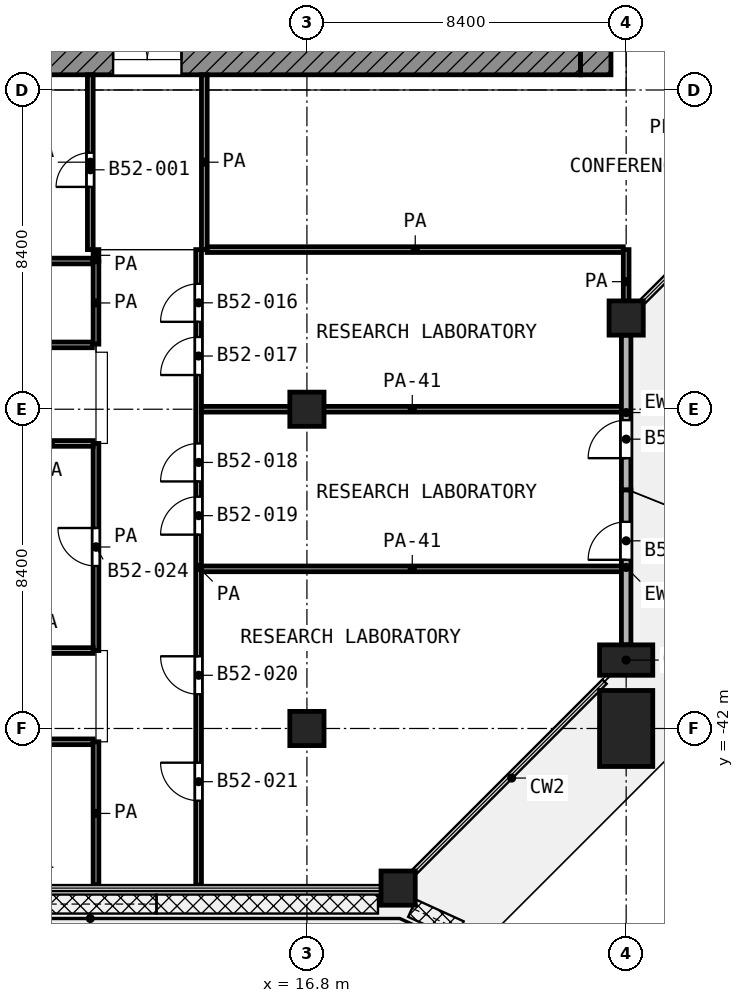
"""IFC4 building model, lengths in metres.
Left out: names, types, materials, properties, quantities, classifications, styles, units other than length and angle.
Written with IfcOpenShell. Run it as: python <this file> out.ifc"""

import sys

from ifc_helpers import new_model, si_unit, direction, frame, frame_2d, origin, origin_2d, place, context, subcontext, project, spatial, rectangle, extrude, element, fill, save


model = new_model("IFC4")
c1 = context("Model", 3, precision=1e-05, world=origin(), true_north=direction((0.0, 1.0)))
c2 = subcontext(c1, "Body", "Model", "MODEL_VIEW")
j1 = project(units=[si_unit("LENGTHUNIT", "METRE"), si_unit("PLANEANGLEUNIT", "RADIAN")], contexts=[c1])
p1 = place(None, origin())
s1 = spatial("IfcSite", under=j1, at=p1, CompositionType="ELEMENT")
p2 = place(p1, origin())
s2 = spatial("IfcBuilding", under=s1, at=p2, CompositionType="ELEMENT")
p3 = place(p2, frame((0.0, 0.0, 226.4)))
s3 = spatial("IfcBuildingStorey", under=s2, at=p3, CompositionType="ELEMENT", Elevation=226.4)
for number, where, z_axis, x_axis in (
    (1, (25.2, -31.2, 0.0), (0.0, 0.0, 1.0), (1.0, 0.0, 0.0)),
    (2, (16.8, -33.6, 0.0), (0.0, 0.0, 1.0), (1.0, 0.0, 0.0)),
):
    element("IfcColumn", number, at=place(p3, frame(where, z_axis=z_axis, x_axis=x_axis)), inside=s3, PredefinedType="COLUMN", context=c2, shape_type="SweptSolid", body=[
        extrude(rectangle(XDim=0.9, YDim=0.9, at=origin_2d()), origin(), (0.0, 0.0, 1.0), 4.2),
    ])
p4 = place(p3, frame((25.2, -40.2, 0.0), z_axis=(0.0, 0.0, 1.0), x_axis=(0.0, -1.0, 0.0)))
e3 = element("IfcColumn", 3, at=p4, inside=s3, PredefinedType="COLUMN", context=c2, shape_type="SweptSolid", body=[
    extrude(rectangle(XDim=0.8, YDim=1.4, at=origin_2d()), origin(), (0.0, 0.0, 1.0), 4.2),
])
for number, where, z_axis, x_axis in (
    (4, (16.8, -42.0, 0.0), (0.0, 0.0, 1.0), (1.0, 0.0, 0.0)),
    (5, (19.2, -46.2, 0.0), (0.0, 0.0, 1.0), (1.0, 0.0, 0.0)),
):
    element("IfcColumn", number, at=place(p3, frame(where, z_axis=z_axis, x_axis=x_axis)), inside=s3, PredefinedType="COLUMN", context=c2, shape_type="SweptSolid", body=[
        extrude(rectangle(XDim=0.9, YDim=0.9, at=origin_2d()), origin(), (0.0, 0.0, 1.0), 4.2),
    ])
p5 = place(p3, frame((25.2, -42.0, 0.0), z_axis=(0.0, 0.0, 1.0), x_axis=(0.0, -1.0, 0.0)))
e6 = element("IfcColumn", 6, at=p5, inside=s3, PredefinedType="COLUMN", context=c2, shape_type="SweptSolid", body=[
    extrude(rectangle(XDim=2.0, YDim=1.4, at=origin_2d()), origin(), (0.0, 0.0, 1.0), 4.2),
])
p6 = place(p3, frame((25.2, -39.8, 0.0), z_axis=(0.0, 0.0, 1.0), x_axis=(0.0, 1.0, 0.0)))
e7 = element("IfcWall", 7, at=p6, inside=s3, PredefinedType="SOLIDWALL", context=c2, shape_type="SweptSolid", body=[
    extrude(rectangle(XDim=4.075, YDim=0.25, at=frame_2d((2.038, 0.0))), origin(), (0.0, 0.0, 1.0), 2.58),
])
p7 = place(p6, frame((2.238, 0.0, 0.0)))
e8 = element("IfcOpeningElement", 8, at=p7, cuts=e7, PredefinedType="OPENING", context=c2, shape_type="SweptSolid", body=[
    extrude(rectangle(XDim=1.0, YDim=2.1, at=frame_2d((0.5, 1.05))), frame((0.0, 0.135, 0.0), z_axis=(0.0, -1.0, 0.0), x_axis=(1.0, 0.0, 0.0)), (0.0, 0.0, 1.0), 0.27),
])
p8 = place(p3, frame((25.2, -35.725, 0.0), z_axis=(0.0, 0.0, 1.0), x_axis=(0.0, 1.0, 0.0)))
e9 = element("IfcWall", 9, at=p8, inside=s3, PredefinedType="SOLIDWALL", context=c2, shape_type="SweptSolid", body=[
    extrude(rectangle(XDim=4.075, YDim=0.25, at=frame_2d((2.038, 0.0))), origin(), (0.0, 0.0, 1.0), 2.58),
])
p9 = place(p8, frame((0.837, 0.0, 0.0)))
e10 = element("IfcOpeningElement", 10, at=p9, cuts=e9, PredefinedType="OPENING", context=c2, shape_type="SweptSolid", body=[
    extrude(rectangle(XDim=1.0, YDim=2.1, at=frame_2d((0.5, 1.05))), frame((0.0, 0.135, 0.0), z_axis=(0.0, -1.0, 0.0), x_axis=(1.0, 0.0, 0.0)), (0.0, 0.0, 1.0), 0.27),
])
p10 = place(p3, frame((5.4, -24.4, 0.0), z_axis=(0.0, 0.0, 1.0), x_axis=(1.0, 0.0, 0.0)))
e11 = element("IfcWall", 11, at=p10, inside=s3, PredefinedType="SHEAR", context=c2, shape_type="SweptSolid", body=[
    extrude(rectangle(XDim=18.6, YDim=0.8, at=frame_2d((9.3, 0.0))), origin(), (0.0, 0.0, 1.0), 3.6),
])
p11 = place(p10, frame((6.3, 0.0, 0.0)))
e12 = element("IfcOpeningElement", 12, at=p11, cuts=e11, PredefinedType="OPENING", context=c2, shape_type="SweptSolid", body=[
    extrude(rectangle(XDim=1.8, YDim=2.1, at=frame_2d((0.9, 1.05))), frame((0.0, 0.41, 0.0), z_axis=(0.0, -1.0, 0.0), x_axis=(1.0, 0.0, 0.0)), (0.0, 0.0, 1.0), 0.82),
])
p12 = place(p3, frame((24.4, -24.8, 0.0), z_axis=(0.0, 0.0, 1.0), x_axis=(0.0, 1.0, 0.0)))
e13 = element("IfcWall", 13, at=p12, inside=s3, PredefinedType="SHEAR", context=c2, shape_type="SweptSolid", body=[
    extrude(rectangle(XDim=0.8, YDim=0.8, at=frame_2d((0.4, 0.0))), origin(), (0.0, 0.0, 1.0), 3.6),
])
p13 = place(p3, frame((2.327, -42.35, 0.0), z_axis=(0.0, 0.0, 1.0), x_axis=(1.0, 0.0, 0.0)))
e14 = element("IfcWall", 14, at=p13, inside=s3, PredefinedType="PARTITIONING", context=c2, shape_type="SweptSolid", body=[
    extrude(rectangle(XDim=8.848, YDim=0.15, at=frame_2d((4.424, 0.0))), origin(), (0.0, 0.0, 1.0), 3.6),
])
p14 = place(p13, frame((3.924, 0.0, 0.0)))
e15 = element("IfcOpeningElement", 15, at=p14, cuts=e14, PredefinedType="OPENING", context=c2, shape_type="SweptSolid", body=[
    extrude(rectangle(XDim=1.0, YDim=2.1, at=frame_2d((0.5, 1.05))), frame((0.0, 0.085, 0.0), z_axis=(0.0, -1.0, 0.0), x_axis=(1.0, 0.0, 0.0)), (0.0, 0.0, 1.0), 0.17),
])
p15 = place(p3, frame((8.73, -39.95, 0.0), z_axis=(0.0, 0.0, 1.0), x_axis=(1.0, 0.0, 0.0)))
e16 = element("IfcWall", 16, at=p15, inside=s3, PredefinedType="PARTITIONING", context=c2, shape_type="SweptSolid", body=[
    extrude(rectangle(XDim=2.445, YDim=0.15, at=frame_2d((1.223, 0.0))), origin(), (0.0, 0.0, 1.0), 3.6),
])
p16 = place(p3, frame((14.025, -37.8, 0.0), z_axis=(0.0, 0.0, 1.0), x_axis=(1.0, 0.0, 0.0)))
e17 = element("IfcWall", 17, at=p16, inside=s3, PredefinedType="PARTITIONING", context=c2, shape_type="SweptSolid", body=[
    extrude(rectangle(XDim=11.095, YDim=0.15, at=frame_2d((5.548, 0.0))), origin(), (0.0, 0.0, 1.0), 2.7),
])
p17 = place(p3, frame((8.925, -34.5, 0.0), z_axis=(0.0, 0.0, 1.0), x_axis=(1.0, 0.0, 0.0)))
e18 = element("IfcWall", 18, at=p17, inside=s3, PredefinedType="PARTITIONING", context=c2, shape_type="SweptSolid", body=[
    extrude(rectangle(XDim=2.25, YDim=0.15, at=frame_2d((1.125, 0.0))), origin(), (0.0, 0.0, 1.0), 3.6),
])
p18 = place(p3, frame((14.025, -33.6, 0.0), z_axis=(0.0, 0.0, 1.0), x_axis=(1.0, 0.0, 0.0)))
e19 = element("IfcWall", 19, at=p18, inside=s3, PredefinedType="PARTITIONING", context=c2, shape_type="SweptSolid", body=[
    extrude(rectangle(XDim=11.095, YDim=0.15, at=frame_2d((5.548, 0.0))), origin(), (0.0, 0.0, 1.0), 2.7),
])
p19 = place(p3, frame((1.001, -31.907, 0.0), z_axis=(0.0, 0.0, 1.0), x_axis=(1.0, 0.0, 0.0)))
e20 = element("IfcWall", 20, at=p19, inside=s3, PredefinedType="PARTITIONING", context=c2, shape_type="SweptSolid", body=[
    extrude(rectangle(XDim=10.154, YDim=0.15, at=frame_2d((5.077, 0.0))), origin(), (0.0, 0.0, 1.0), 3.6),
])
p20 = place(p19, frame((4.615, 0.0, 0.0)))
e21 = element("IfcOpeningElement", 21, at=p20, cuts=e20, PredefinedType="OPENING", context=c2, shape_type="SweptSolid", body=[
    extrude(rectangle(XDim=1.0, YDim=2.1, at=frame_2d((0.5, 1.05))), frame((0.0, 0.085, 0.0), z_axis=(0.0, -1.0, 0.0), x_axis=(1.0, 0.0, 0.0)), (0.0, 0.0, 1.0), 0.17),
])
p21 = place(p3, frame((0.075, -29.7, 0.0), z_axis=(0.0, 0.0, 1.0), x_axis=(1.0, 0.0, 0.0)))
e22 = element("IfcWall", 22, at=p21, inside=s3, PredefinedType="PARTITIONING", context=c2, shape_type="SweptSolid", body=[
    extrude(rectangle(XDim=11.08, YDim=0.15, at=frame_2d((5.54, 0.0))), origin(), (0.0, 0.0, 1.0), 3.6),
])
p22 = place(p3, frame((14.175, -29.4, 0.0), z_axis=(0.0, 0.0, 1.0), x_axis=(1.0, 0.0, 0.0)))
e23 = element("IfcWall", 23, at=p22, inside=s3, PredefinedType="PARTITIONING", context=c2, shape_type="SweptSolid", body=[
    extrude(rectangle(XDim=10.95, YDim=0.15, at=frame_2d((5.475, 0.0))), origin(), (0.0, 0.0, 1.0), 3.6),
])
p23 = place(p3, frame((11.1, -29.4, 0.0), z_axis=(0.0, 0.0, 1.0), x_axis=(0.0, 1.0, 0.0)))
e24 = element("IfcWall", 24, at=p23, inside=s3, PredefinedType="PARTITIONING", context=c2, shape_type="SweptSolid", body=[
    extrude(rectangle(XDim=4.6, YDim=0.15, at=frame_2d((2.3, 0.0))), origin(), (0.0, 0.0, 1.0), 3.6),
])
p24 = place(p23, frame((1.65, 0.0, 0.0)))
e25 = element("IfcOpeningElement", 25, at=p24, cuts=e24, PredefinedType="OPENING", context=c2, shape_type="SweptSolid", body=[
    extrude(rectangle(XDim=0.9, YDim=2.1, at=frame_2d((0.45, 1.05))), frame((0.0, 0.085, 0.0), z_axis=(0.0, -1.0, 0.0), x_axis=(1.0, 0.0, 0.0)), (0.0, 0.0, 1.0), 0.17),
])
p25 = place(p3, frame((11.25, -46.12, 0.0), z_axis=(0.0, 0.0, 1.0), x_axis=(0.0, 1.0, 0.0)))
e26 = element("IfcWall", 26, at=p25, inside=s3, PredefinedType="PARTITIONING", context=c2, shape_type="SweptSolid", body=[
    extrude(rectangle(XDim=3.77, YDim=0.15, at=frame_2d((1.885, 0.0))), origin(), (0.0, 0.0, 1.0), 3.6),
])
p26 = place(p3, frame((11.25, -39.95, 0.0), z_axis=(0.0, 0.0, 1.0), x_axis=(0.0, 1.0, 0.0)))
e27 = element("IfcWall", 27, at=p26, inside=s3, PredefinedType="PARTITIONING", context=c2, shape_type="SweptSolid", body=[
    extrude(rectangle(XDim=5.45, YDim=0.15, at=frame_2d((2.725, 0.0))), origin(), (0.0, 0.0, 1.0), 3.6),
])
p27 = place(p26, frame((2.225, 0.0, 0.0)))
e28 = element("IfcOpeningElement", 28, at=p27, cuts=e27, PredefinedType="OPENING", context=c2, shape_type="SweptSolid", body=[
    extrude(rectangle(XDim=1.0, YDim=2.1, at=frame_2d((0.5, 1.05))), frame((0.0, 0.085, 0.0), z_axis=(0.0, -1.0, 0.0), x_axis=(1.0, 0.0, 0.0)), (0.0, 0.0, 1.0), 0.17),
])
p28 = place(p3, frame((11.25, -31.887, 0.0), z_axis=(0.0, 0.0, 1.0), x_axis=(0.0, 1.0, 0.0)))
e29 = element("IfcWall", 29, at=p28, inside=s3, PredefinedType="PARTITIONING", context=c2, shape_type="SweptSolid", body=[
    extrude(rectangle(XDim=2.167, YDim=0.15, at=frame_2d((1.083, 0.0))), origin(), (0.0, 0.0, 1.0), 3.6),
])
p29 = place(p3, frame((11.25, -29.7, 0.0), z_axis=(0.0, 0.0, 1.0), x_axis=(0.0, 1.0, 0.0)))
e30 = element("IfcWall", 30, at=p29, inside=s3, PredefinedType="PARTITIONING", context=c2, shape_type="SweptSolid", body=[
    extrude(rectangle(XDim=0.3, YDim=0.15, at=frame_2d((0.15, 0.0))), origin(), (0.0, 0.0, 1.0), 3.6),
])
p30 = place(p3, frame((13.95, -46.12, 0.0), z_axis=(0.0, 0.0, 1.0), x_axis=(0.0, 1.0, 0.0)))
e31 = element("IfcWall", 31, at=p30, inside=s3, PredefinedType="PARTITIONING", context=c2, shape_type="SweptSolid", body=[
    extrude(rectangle(XDim=16.72, YDim=0.15, at=frame_2d((8.36, 0.0))), origin(), (0.0, 0.0, 1.0), 3.6),
])
p31 = place(p30, frame((14.82, 0.0, 0.0)))
e32 = element("IfcOpeningElement", 32, at=p31, cuts=e31, PredefinedType="OPENING", context=c2, shape_type="SweptSolid", body=[
    extrude(rectangle(XDim=1.0, YDim=2.1, at=frame_2d((0.5, 1.05))), frame((0.0, 0.085, 0.0), z_axis=(0.0, -1.0, 0.0), x_axis=(1.0, 0.0, 0.0)), (0.0, 0.0, 1.0), 0.17),
])
p32 = place(p30, frame((13.42, 0.0, 0.0)))
e33 = element("IfcOpeningElement", 33, at=p32, cuts=e31, PredefinedType="OPENING", context=c2, shape_type="SweptSolid", body=[
    extrude(rectangle(XDim=1.0, YDim=2.1, at=frame_2d((0.5, 1.05))), frame((0.0, 0.085, 0.0), z_axis=(0.0, -1.0, 0.0), x_axis=(1.0, 0.0, 0.0)), (0.0, 0.0, 1.0), 0.17),
])
p33 = place(p30, frame((10.62, 0.0, 0.0)))
e34 = element("IfcOpeningElement", 34, at=p33, cuts=e31, PredefinedType="OPENING", context=c2, shape_type="SweptSolid", body=[
    extrude(rectangle(XDim=1.0, YDim=2.1, at=frame_2d((0.5, 1.05))), frame((0.0, 0.085, 0.0), z_axis=(0.0, -1.0, 0.0), x_axis=(1.0, 0.0, 0.0)), (0.0, 0.0, 1.0), 0.17),
])
p34 = place(p30, frame((9.22, 0.0, 0.0)))
e35 = element("IfcOpeningElement", 35, at=p34, cuts=e31, PredefinedType="OPENING", context=c2, shape_type="SweptSolid", body=[
    extrude(rectangle(XDim=1.0, YDim=2.1, at=frame_2d((0.5, 1.05))), frame((0.0, 0.085, 0.0), z_axis=(0.0, -1.0, 0.0), x_axis=(1.0, 0.0, 0.0)), (0.0, 0.0, 1.0), 0.17),
])
p35 = place(p30, frame((5.02, 0.0, 0.0)))
e36 = element("IfcOpeningElement", 36, at=p35, cuts=e31, PredefinedType="OPENING", context=c2, shape_type="SweptSolid", body=[
    extrude(rectangle(XDim=1.0, YDim=2.1, at=frame_2d((0.5, 1.05))), frame((0.0, 0.085, 0.0), z_axis=(0.0, -1.0, 0.0), x_axis=(1.0, 0.0, 0.0)), (0.0, 0.0, 1.0), 0.17),
])
p36 = place(p30, frame((2.22, 0.0, 0.0)))
e37 = element("IfcOpeningElement", 37, at=p36, cuts=e31, PredefinedType="OPENING", context=c2, shape_type="SweptSolid", body=[
    extrude(rectangle(XDim=1.0, YDim=2.1, at=frame_2d((0.5, 1.05))), frame((0.0, 0.085, 0.0), z_axis=(0.0, -1.0, 0.0), x_axis=(1.0, 0.0, 0.0)), (0.0, 0.0, 1.0), 0.17),
])
p37 = place(p3, frame((14.1, -29.4, 0.0), z_axis=(0.0, 0.0, 1.0), x_axis=(0.0, 1.0, 0.0)))
e38 = element("IfcWall", 38, at=p37, inside=s3, PredefinedType="PARTITIONING", context=c2, shape_type="SweptSolid", body=[
    extrude(rectangle(XDim=4.6, YDim=0.15, at=frame_2d((2.3, 0.0))), origin(), (0.0, 0.0, 1.0), 3.6),
])
p38 = place(p3, frame((25.2, -31.087, 0.0), z_axis=(0.0, 0.0, 1.0), x_axis=(0.0, 1.0, 0.0)))
e39 = element("IfcWall", 39, at=p38, inside=s3, PredefinedType="PARTITIONING", context=c2, shape_type="SweptSolid", body=[
    extrude(rectangle(XDim=1.687, YDim=0.15, at=frame_2d((0.844, 0.0))), origin(), (0.0, 0.0, 1.0), 3.6),
])
p39 = place(p7, origin())
e40 = element("IfcDoor", 40, at=p39, inside=s3, OperationType="SINGLE_SWING_LEFT", PredefinedType="DOOR", context=c2, shape_type="SweptSolid", body=[
    extrude(rectangle(XDim=1.0, YDim=2.1, at=frame_2d((0.5, 1.05))), frame((0.0, 0.025, 0.0), z_axis=(0.0, -1.0, 0.0), x_axis=(1.0, 0.0, 0.0)), (0.0, 0.0, 1.0), 0.05),
])
fill(e8, e40)
p40 = place(p9, origin())
e41 = element("IfcDoor", 41, at=p40, inside=s3, OperationType="SINGLE_SWING_LEFT", PredefinedType="DOOR", context=c2, shape_type="SweptSolid", body=[
    extrude(rectangle(XDim=1.0, YDim=2.1, at=frame_2d((0.5, 1.05))), frame((0.0, 0.025, 0.0), z_axis=(0.0, -1.0, 0.0), x_axis=(1.0, 0.0, 0.0)), (0.0, 0.0, 1.0), 0.05),
])
fill(e10, e41)
p41 = place(p11, origin())
e42 = element("IfcDoor", 42, at=p41, inside=s3, OperationType="DOUBLE_DOOR_SINGLE_SWING", PredefinedType="DOOR", context=c2, shape_type="SweptSolid", body=[
    extrude(rectangle(XDim=1.8, YDim=2.1, at=frame_2d((0.9, 1.05))), frame((0.0, 0.025, 0.0), z_axis=(0.0, -1.0, 0.0), x_axis=(1.0, 0.0, 0.0)), (0.0, 0.0, 1.0), 0.05),
])
fill(e12, e42)
p42 = place(p24, origin())
e43 = element("IfcDoor", 43, at=p42, inside=s3, OperationType="SINGLE_SWING_LEFT", PredefinedType="DOOR", context=c2, shape_type="SweptSolid", body=[
    extrude(rectangle(XDim=0.9, YDim=2.1, at=frame_2d((0.45, 1.05))), frame((0.0, 0.025, 0.0), z_axis=(0.0, -1.0, 0.0), x_axis=(1.0, 0.0, 0.0)), (0.0, 0.0, 1.0), 0.05),
])
fill(e25, e43)
p43 = place(p31, origin())
e44 = element("IfcDoor", 44, at=p43, inside=s3, OperationType="SINGLE_SWING_LEFT", PredefinedType="DOOR", context=c2, shape_type="SweptSolid", body=[
    extrude(rectangle(XDim=1.0, YDim=2.1, at=frame_2d((0.5, 1.05))), frame((0.0, 0.025, 0.0), z_axis=(0.0, -1.0, 0.0), x_axis=(1.0, 0.0, 0.0)), (0.0, 0.0, 1.0), 0.05),
])
fill(e32, e44)
p44 = place(p32, origin())
e45 = element("IfcDoor", 45, at=p44, inside=s3, OperationType="SINGLE_SWING_LEFT", PredefinedType="DOOR", context=c2, shape_type="SweptSolid", body=[
    extrude(rectangle(XDim=1.0, YDim=2.1, at=frame_2d((0.5, 1.05))), frame((0.0, 0.025, 0.0), z_axis=(0.0, -1.0, 0.0), x_axis=(1.0, 0.0, 0.0)), (0.0, 0.0, 1.0), 0.05),
])
fill(e33, e45)
p45 = place(p33, origin())
e46 = element("IfcDoor", 46, at=p45, inside=s3, OperationType="SINGLE_SWING_LEFT", PredefinedType="DOOR", context=c2, shape_type="SweptSolid", body=[
    extrude(rectangle(XDim=1.0, YDim=2.1, at=frame_2d((0.5, 1.05))), frame((0.0, 0.025, 0.0), z_axis=(0.0, -1.0, 0.0), x_axis=(1.0, 0.0, 0.0)), (0.0, 0.0, 1.0), 0.05),
])
fill(e34, e46)
p46 = place(p34, origin())
e47 = element("IfcDoor", 47, at=p46, inside=s3, OperationType="SINGLE_SWING_LEFT", PredefinedType="DOOR", context=c2, shape_type="SweptSolid", body=[
    extrude(rectangle(XDim=1.0, YDim=2.1, at=frame_2d((0.5, 1.05))), frame((0.0, 0.025, 0.0), z_axis=(0.0, -1.0, 0.0), x_axis=(1.0, 0.0, 0.0)), (0.0, 0.0, 1.0), 0.05),
])
fill(e35, e47)
p47 = place(p35, origin())
e48 = element("IfcDoor", 48, at=p47, inside=s3, OperationType="SINGLE_SWING_RIGHT", PredefinedType="DOOR", context=c2, shape_type="SweptSolid", body=[
    extrude(rectangle(XDim=1.0, YDim=2.1, at=frame_2d((0.5, 1.05))), frame((0.0, 0.025, 0.0), z_axis=(0.0, -1.0, 0.0), x_axis=(1.0, 0.0, 0.0)), (0.0, 0.0, 1.0), 0.05),
])
fill(e36, e48)
p48 = place(p36, origin())
e49 = element("IfcDoor", 49, at=p48, inside=s3, OperationType="SINGLE_SWING_RIGHT", PredefinedType="DOOR", context=c2, shape_type="SweptSolid", body=[
    extrude(rectangle(XDim=1.0, YDim=2.1, at=frame_2d((0.5, 1.05))), frame((0.0, 0.025, 0.0), z_axis=(0.0, -1.0, 0.0), x_axis=(1.0, 0.0, 0.0)), (0.0, 0.0, 1.0), 0.05),
])
fill(e37, e49)
p49 = place(p27, origin())
e50 = element("IfcDoor", 50, at=p49, inside=s3, OperationType="SINGLE_SWING_RIGHT", PredefinedType="DOOR", context=c2, shape_type="SweptSolid", body=[
    extrude(rectangle(XDim=1.0, YDim=2.1, at=frame_2d((0.5, 1.05))), frame((0.0, 0.025, 0.0), z_axis=(0.0, -1.0, 0.0), x_axis=(1.0, 0.0, 0.0)), (0.0, 0.0, 1.0), 0.05),
])
fill(e28, e50)
save(model, sys.argv[1])
